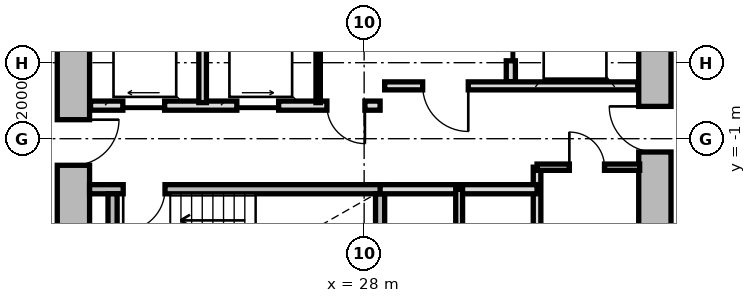
"""IFC4 building model, lengths in metres.
Left out: names, types, materials, properties, quantities, classifications, styles, units other than length and angle.
Written with IfcOpenShell. Run it as: python <this file> out.ifc"""

import sys

from ifc_helpers import new_model, si_unit, direction, frame, frame_2d, origin, place, context, subcontext, project, spatial, rectangle, extrude, source, transform, mapped, element, fill, save


model = new_model("IFC4")
c1 = context("Model", 3, precision=1e-05, world=origin(), true_north=direction((0.0, 1.0)))
c2 = subcontext(c1, "Body", "Model", "MODEL_VIEW")
j1 = project(units=[si_unit("LENGTHUNIT", "METRE"), si_unit("PLANEANGLEUNIT", "RADIAN")], contexts=[c1])
p1 = place(None, origin())
s1 = spatial("IfcSite", under=j1, at=p1, CompositionType="ELEMENT")
p2 = place(p1, origin())
s2 = spatial("IfcBuilding", under=s1, at=p2, CompositionType="ELEMENT")
p3 = place(p2, frame((0.0, 0.0, 39.9)))
s3 = spatial("IfcBuildingStorey", under=s2, at=p3, CompositionType="ELEMENT", Elevation=39.9)
m1 = source(origin(), c2, "Body", "SweptSolid", [
    extrude(rectangle(XDim=11.0, YDim=0.85, at=frame_2d((5.5, 0.0))), origin(), (0.0, 0.0, 1.0), 2.79),
])
p4 = place(p3, frame((20.35, -5.5, 0.0), z_axis=(0.0, 0.0, 1.0), x_axis=(0.0, 1.0, 0.0)))
e1 = element("IfcWall", 1, at=p4, inside=s3, PredefinedType="SHEAR", context=c2, shape_type="MappedRepresentation", body=[
    mapped(m1, transform((0.0, 0.0, 0.0), x_axis=(1.0, 0.0, 0.0), y_axis=(0.0, 1.0, 0.0), z_axis=(0.0, 0.0, 1.0), scale=1.0)),
])
p5 = place(p4, frame((3.8, 0.0, 0.0)))
e2 = element("IfcOpeningElement", 2, at=p5, cuts=e1, PredefinedType="OPENING", context=c2, shape_type="SweptSolid", body=[
    extrude(rectangle(XDim=1.2, YDim=2.15, at=frame_2d((0.6, 1.075))), frame((0.0, 0.435, 0.0), z_axis=(0.0, -1.0, 0.0), x_axis=(1.0, 0.0, 0.0)), (0.0, 0.0, 1.0), 0.87),
])
p6 = place(p3, frame((35.65, 5.5, 0.0), z_axis=(0.0, 0.0, 1.0), x_axis=(0.0, -1.0, 0.0)))
e3 = element("IfcWall", 3, at=p6, inside=s3, PredefinedType="SHEAR", context=c2, shape_type="MappedRepresentation", body=[
    mapped(m1, transform((0.0, 0.0, 0.0), x_axis=(1.0, 0.0, 0.0), y_axis=(0.0, 1.0, 0.0), z_axis=(0.0, 0.0, 1.0), scale=1.0)),
])
p7 = place(p6, frame((5.65, 0.0, 0.0)))
e4 = element("IfcOpeningElement", 4, at=p7, cuts=e3, PredefinedType="OPENING", context=c2, shape_type="SweptSolid", body=[
    extrude(rectangle(XDim=1.2, YDim=2.15, at=frame_2d((0.6, 1.075))), frame((0.0, 0.435, 0.0), z_axis=(0.0, -1.0, 0.0), x_axis=(1.0, 0.0, 0.0)), (0.0, 0.0, 1.0), 0.87),
])
p8 = place(p6, frame((9.3, 0.0, 0.0)))
e5 = element("IfcOpeningElement", 5, at=p8, cuts=e3, PredefinedType="OPENING", context=c2, shape_type="SweptSolid", body=[
    extrude(rectangle(XDim=1.0, YDim=2.1, at=frame_2d((0.5, 1.05))), frame((0.0, 0.435, 0.0), z_axis=(0.0, -1.0, 0.0), x_axis=(1.0, 0.0, 0.0)), (0.0, 0.0, 1.0), 0.87),
])
m2 = source(origin(), c2, "Body", "SweptSolid", [
    extrude(rectangle(XDim=7.765, YDim=0.24, at=frame_2d((3.883, 0.0))), origin(), (0.0, 0.0, 1.0), 2.79),
])
p9 = place(p3, frame((20.775, -2.33, 0.0), z_axis=(0.0, 0.0, 1.0), x_axis=(1.0, 0.0, 0.0)))
e6 = element("IfcWall", 6, at=p9, inside=s3, PredefinedType="PARTITIONING", context=c2, shape_type="MappedRepresentation", body=[
    mapped(m2, transform((0.0, 0.0, 0.0), x_axis=(1.0, 0.0, 0.0), y_axis=(0.0, 1.0, 0.0), z_axis=(0.0, 0.0, 1.0), scale=1.0)),
])
p10 = place(p9, frame((0.885, 0.0, 0.0)))
e7 = element("IfcOpeningElement", 7, at=p10, cuts=e6, PredefinedType="OPENING", context=c2, shape_type="SweptSolid", body=[
    extrude(rectangle(XDim=1.1, YDim=2.15, at=frame_2d((0.55, 1.075))), frame((0.0, 0.13, 0.0), z_axis=(0.0, -1.0, 0.0), x_axis=(1.0, 0.0, 0.0)), (0.0, 0.0, 1.0), 0.26),
])
m3 = source(origin(), c2, "Body", "SweptSolid", [
    extrude(rectangle(XDim=3.075, YDim=0.24, at=frame_2d((1.538, 0.0))), origin(), (0.0, 0.0, 1.0), 2.79),
])
for number, where, z_axis, x_axis in (
    (8, (21.38, -5.525, 0.0), (0.0, 0.0, 1.0), (0.0, 1.0, 0.0)),
    (9, (28.42, -5.525, 0.0), (0.0, 0.0, 1.0), (0.0, 1.0, 0.0)),
):
    element("IfcWall", number, at=place(p3, frame(where, z_axis=z_axis, x_axis=x_axis)), inside=s3, PredefinedType="PARTITIONING", context=c2, shape_type="MappedRepresentation", body=[
        mapped(m3, transform((0.0, 0.0, 0.0), x_axis=(1.0, 0.0, 0.0), y_axis=(0.0, 1.0, 0.0), z_axis=(0.0, 0.0, 1.0), scale=1.0)),
    ])
m4 = source(origin(), c2, "Body", "SweptSolid", [
    extrude(rectangle(XDim=5.0, YDim=0.24, at=frame_2d((2.5, 0.0))), origin(), (0.0, 0.0, 1.0), 2.775),
])
p11 = place(p3, frame((31.86, 0.5, 0.0), z_axis=(0.0, 0.0, 1.0), x_axis=(0.0, 1.0, 0.0)))
e10 = element("IfcWall", 10, at=p11, inside=s3, PredefinedType="PARTITIONING", context=c2, shape_type="MappedRepresentation", body=[
    mapped(m4, transform((0.0, 0.0, 0.0), x_axis=(1.0, 0.0, 0.0), y_axis=(0.0, 1.0, 0.0), z_axis=(0.0, 0.0, 1.0), scale=1.0)),
])
p12 = place(p11, frame((3.05, 0.0, 0.0)))
e11 = element("IfcOpeningElement", 11, at=p12, cuts=e10, PredefinedType="OPENING", context=c2, shape_type="SweptSolid", body=[
    extrude(rectangle(XDim=1.3, YDim=2.2, at=frame_2d((0.65, 1.1))), frame((0.0, 0.13, 0.0), z_axis=(0.0, -1.0, 0.0), x_axis=(1.0, 0.0, 0.0)), (0.0, 0.0, 1.0), 0.26),
])
p13 = place(p11, frame((0.55, 0.0, 0.0)))
e12 = element("IfcOpeningElement", 12, at=p13, cuts=e10, PredefinedType="OPENING", context=c2, shape_type="SweptSolid", body=[
    extrude(rectangle(XDim=1.3, YDim=2.2, at=frame_2d((0.65, 1.1))), frame((0.0, 0.13, 0.0), z_axis=(0.0, -1.0, 0.0), x_axis=(1.0, 0.0, 0.0)), (0.0, 0.0, 1.0), 0.26),
])
m5 = source(origin(), c2, "Body", "SweptSolid", [
    extrude(rectangle(XDim=6.66, YDim=0.21, at=frame_2d((3.33, 0.0))), origin(), (0.0, 0.0, 1.0), 2.775),
])
p14 = place(p3, frame((28.54, 0.39, 0.0), z_axis=(0.0, 0.0, 1.0), x_axis=(1.0, 0.0, 0.0)))
e13 = element("IfcWall", 13, at=p14, inside=s3, PredefinedType="PARTITIONING", context=c2, shape_type="MappedRepresentation", body=[
    mapped(m5, transform((0.0, 0.0, 0.0), x_axis=(1.0, 0.0, 0.0), y_axis=(0.0, 1.0, 0.0), z_axis=(0.0, 0.0, 1.0), scale=1.0)),
])
p15 = place(p14, frame((1.0, 0.0, 0.0)))
e14 = element("IfcOpeningElement", 14, at=p15, cuts=e13, PredefinedType="OPENING", context=c2, shape_type="SweptSolid", body=[
    extrude(rectangle(XDim=1.2, YDim=2.15, at=frame_2d((0.6, 1.075))), frame((0.0, 0.115, 0.0), z_axis=(0.0, -1.0, 0.0), x_axis=(1.0, 0.0, 0.0)), (0.0, 0.0, 1.0), 0.23),
])
m6 = source(origin(), c2, "Body", "SweptSolid", [
    extrude(rectangle(XDim=7.62, YDim=0.24, at=frame_2d((3.81, 0.0))), origin(), (0.0, 0.0, 1.0), 2.775),
])
p16 = place(p3, frame((20.8, -0.13, 0.0), z_axis=(0.0, 0.0, 1.0), x_axis=(1.0, 0.0, 0.0)))
e15 = element("IfcWall", 15, at=p16, inside=s3, PredefinedType="PARTITIONING", context=c2, shape_type="MappedRepresentation", body=[
    mapped(m6, transform((0.0, 0.0, 0.0), x_axis=(1.0, 0.0, 0.0), y_axis=(0.0, 1.0, 0.0), z_axis=(0.0, 0.0, 1.0), scale=1.0)),
])
p17 = place(p16, frame((6.22, 0.0, 0.0)))
e16 = element("IfcOpeningElement", 16, at=p17, cuts=e15, PredefinedType="OPENING", context=c2, shape_type="SweptSolid", body=[
    extrude(rectangle(XDim=1.0, YDim=2.1, at=frame_2d((0.5, 1.05))), frame((0.0, 0.13, 0.0), z_axis=(0.0, -1.0, 0.0), x_axis=(1.0, 0.0, 0.0)), (0.0, 0.0, 1.0), 0.26),
])
p18 = place(p16, frame((0.85, 0.0, 0.0)))
e17 = element("IfcOpeningElement", 17, at=p18, cuts=e15, PredefinedType="OPENING", context=c2, shape_type="SweptSolid", body=[
    extrude(rectangle(XDim=1.1, YDim=2.2, at=frame_2d((0.55, 1.1))), frame((0.0, 0.13, 0.0), z_axis=(0.0, -1.0, 0.0), x_axis=(1.0, 0.0, 0.0)), (0.0, 0.0, 1.0), 0.26),
])
p19 = place(p16, frame((3.85, 0.0, 0.0)))
e18 = element("IfcOpeningElement", 18, at=p19, cuts=e15, PredefinedType="OPENING", context=c2, shape_type="SweptSolid", body=[
    extrude(rectangle(XDim=1.1, YDim=2.2, at=frame_2d((0.55, 1.1))), frame((0.0, 0.13, 0.0), z_axis=(0.0, -1.0, 0.0), x_axis=(1.0, 0.0, 0.0)), (0.0, 0.0, 1.0), 0.26),
])
m7 = source(origin(), c2, "Body", "SweptSolid", [
    extrude(rectangle(XDim=2.33, YDim=0.115, at=frame_2d((1.165, 0.0))), origin(), (0.0, 0.0, 1.0), 2.775),
])
p20 = place(p3, frame((26.79, -0.05, 0.0), z_axis=(0.0, 0.0, 1.0), x_axis=(0.0, 1.0, 0.0)))
e19 = element("IfcWall", 19, at=p20, inside=s3, PredefinedType="PARTITIONING", context=c2, shape_type="MappedRepresentation", body=[
    mapped(m7, transform((0.0, 0.0, 0.0), x_axis=(1.0, 0.0, 0.0), y_axis=(0.0, 1.0, 0.0), z_axis=(0.0, 0.0, 1.0), scale=1.0)),
])
m8 = source(origin(), c2, "Body", "SweptSolid", [
    extrude(rectangle(XDim=2.33, YDim=0.2, at=frame_2d((1.165, 0.0))), origin(), (0.0, 0.0, 1.0), 2.775),
])
p21 = place(p3, frame((23.75, -0.05, 0.0), z_axis=(0.0, 0.0, 1.0), x_axis=(0.0, 1.0, 0.0)))
e20 = element("IfcWall", 20, at=p21, inside=s3, PredefinedType="PARTITIONING", context=c2, shape_type="MappedRepresentation", body=[
    mapped(m8, transform((0.0, 0.0, 0.0), x_axis=(1.0, 0.0, 0.0), y_axis=(0.0, 1.0, 0.0), z_axis=(0.0, 0.0, 1.0), scale=1.0)),
])
m9 = source(origin(), c2, "Body", "SweptSolid", [
    extrude(rectangle(XDim=3.8, YDim=0.2, at=frame_2d((1.9, 0.0))), origin(), (0.0, 0.0, 1.0), 2.775),
])
p22 = place(p3, frame((32.55, -5.55, 0.0), z_axis=(0.0, 0.0, 1.0), x_axis=(0.0, 1.0, 0.0)))
e21 = element("IfcWall", 21, at=p22, inside=s3, PredefinedType="PARTITIONING", context=c2, shape_type="MappedRepresentation", body=[
    mapped(m9, transform((0.0, 0.0, 0.0), x_axis=(1.0, 0.0, 0.0), y_axis=(0.0, 1.0, 0.0), z_axis=(0.0, 0.0, 1.0), scale=1.0)),
])
m10 = source(origin(), c2, "Body", "SweptSolid", [
    extrude(rectangle(XDim=4.13, YDim=0.24, at=frame_2d((2.065, 0.0))), origin(), (0.0, 0.0, 1.0), 2.775),
])
p23 = place(p3, frame((28.42, -2.33, 0.0), z_axis=(0.0, 0.0, 1.0), x_axis=(1.0, 0.0, 0.0)))
e22 = element("IfcWall", 22, at=p23, inside=s3, PredefinedType="PARTITIONING", context=c2, shape_type="MappedRepresentation", body=[
    mapped(m10, transform((0.0, 0.0, 0.0), x_axis=(1.0, 0.0, 0.0), y_axis=(0.0, 1.0, 0.0), z_axis=(0.0, 0.0, 1.0), scale=1.0)),
])
m11 = source(origin(), c2, "Body", "SweptSolid", [
    extrude(rectangle(XDim=3.22, YDim=0.18, at=frame_2d((1.61, 0.0))), origin(), (0.0, 0.0, 1.0), 2.775),
])
p24 = place(p3, frame((30.5, -5.55, 0.0), z_axis=(0.0, 0.0, 1.0), x_axis=(0.0, 1.0, 0.0)))
e23 = element("IfcWall", 23, at=p24, inside=s3, PredefinedType="PARTITIONING", context=c2, shape_type="MappedRepresentation", body=[
    mapped(m11, transform((0.0, 0.0, 0.0), x_axis=(1.0, 0.0, 0.0), y_axis=(0.0, 1.0, 0.0), z_axis=(0.0, 0.0, 1.0), scale=1.0)),
])
m12 = source(origin(), c2, "Body", "SweptSolid", [
    extrude(rectangle(XDim=2.7, YDim=0.165, at=frame_2d((1.35, 0.0))), origin(), (0.0, 0.0, 1.0), 2.775),
])
p25 = place(p3, frame((32.55, -1.75, 0.0), z_axis=(0.0, 0.0, 1.0), x_axis=(1.0, 0.0, 0.0)))
e24 = element("IfcWall", 24, at=p25, inside=s3, PredefinedType="PARTITIONING", context=c2, shape_type="MappedRepresentation", body=[
    mapped(m12, transform((0.0, 0.0, 0.0), x_axis=(1.0, 0.0, 0.0), y_axis=(0.0, 1.0, 0.0), z_axis=(0.0, 0.0, 1.0), scale=1.0)),
])
p26 = place(p25, frame((0.85, 0.0, 0.0)))
e25 = element("IfcOpeningElement", 25, at=p26, cuts=e24, PredefinedType="OPENING", context=c2, shape_type="SweptSolid", body=[
    extrude(rectangle(XDim=0.925, YDim=2.1, at=frame_2d((0.462, 1.05))), frame((0.0, 0.093, 0.0), z_axis=(0.0, -1.0, 0.0), x_axis=(1.0, 0.0, 0.0)), (0.0, 0.0, 1.0), 0.185),
])
m13 = source(origin(), c2, "Body", "SweptSolid", [
    extrude(rectangle(XDim=1.1, YDim=2.15, at=frame_2d((0.55, 1.075))), frame((0.0, 0.025, 0.0), z_axis=(0.0, -1.0, 0.0), x_axis=(1.0, 0.0, 0.0)), (0.0, 0.0, 1.0), 0.05),
])
p27 = place(p10, frame((1.1, 0.0, 0.0), z_axis=(0.0, 0.0, 1.0), x_axis=(-1.0, 0.0, 0.0)))
e26 = element("IfcDoor", 26, at=p27, inside=s3, OperationType="SINGLE_SWING_RIGHT", PredefinedType="DOOR", context=c2, shape_type="MappedRepresentation", body=[
    mapped(m13, transform((0.0, 0.0, 0.0), x_axis=(1.0, 0.0, 0.0), y_axis=(0.0, 1.0, 0.0), z_axis=(0.0, 0.0, 1.0), scale=1.0)),
])
fill(e7, e26)
m14 = source(origin(), c2, "Body", "SweptSolid", [
    extrude(rectangle(XDim=1.3, YDim=2.2, at=frame_2d((0.65, 1.1))), frame((0.0, 0.025, 0.0), z_axis=(0.0, -1.0, 0.0), x_axis=(1.0, 0.0, 0.0)), (0.0, 0.0, 1.0), 0.05),
])
p28 = place(p13, origin())
e27 = element("IfcDoor", 27, at=p28, inside=s3, OperationType="SLIDING_TO_RIGHT", PredefinedType="DOOR", context=c2, shape_type="MappedRepresentation", body=[
    mapped(m14, transform((0.0, 0.0, 0.0), x_axis=(1.0, 0.0, 0.0), y_axis=(0.0, 1.0, 0.0), z_axis=(0.0, 0.0, 1.0), scale=1.0)),
])
fill(e12, e27)
m15 = source(origin(), c2, "Body", "SweptSolid", [
    extrude(rectangle(XDim=1.2, YDim=2.15, at=frame_2d((0.6, 1.075))), frame((0.0, 0.025, 0.0), z_axis=(0.0, -1.0, 0.0), x_axis=(1.0, 0.0, 0.0)), (0.0, 0.0, 1.0), 0.05),
])
p29 = place(p15, frame((1.2, 0.0, 0.0), z_axis=(0.0, 0.0, 1.0), x_axis=(-1.0, 0.0, 0.0)))
e28 = element("IfcDoor", 28, at=p29, inside=s3, OperationType="SINGLE_SWING_LEFT", PredefinedType="DOOR", context=c2, shape_type="MappedRepresentation", body=[
    mapped(m15, transform((0.0, 0.0, 0.0), x_axis=(1.0, 0.0, 0.0), y_axis=(0.0, 1.0, 0.0), z_axis=(0.0, 0.0, 1.0), scale=1.0)),
])
fill(e14, e28)
p30 = place(p5, frame((1.2, 0.0, 0.0), z_axis=(0.0, 0.0, 1.0), x_axis=(-1.0, 0.0, 0.0)))
e29 = element("IfcDoor", 29, at=p30, inside=s3, OperationType="SINGLE_SWING_LEFT", PredefinedType="DOOR", context=c2, shape_type="MappedRepresentation", body=[
    mapped(m15, transform((0.0, 0.0, 0.0), x_axis=(1.0, 0.0, 0.0), y_axis=(0.0, 1.0, 0.0), z_axis=(0.0, 0.0, 1.0), scale=1.0)),
])
fill(e2, e29)
p31 = place(p7, frame((1.2, 0.0, 0.0), z_axis=(0.0, 0.0, 1.0), x_axis=(-1.0, 0.0, 0.0)))
e30 = element("IfcDoor", 30, at=p31, inside=s3, OperationType="SINGLE_SWING_RIGHT", PredefinedType="DOOR", context=c2, shape_type="MappedRepresentation", body=[
    mapped(m15, transform((0.0, 0.0, 0.0), x_axis=(1.0, 0.0, 0.0), y_axis=(0.0, 1.0, 0.0), z_axis=(0.0, 0.0, 1.0), scale=1.0)),
])
fill(e4, e30)
m16 = source(origin(), c2, "Body", "SweptSolid", [
    extrude(rectangle(XDim=1.0, YDim=2.1, at=frame_2d((0.5, 1.05))), frame((0.0, 0.025, 0.0), z_axis=(0.0, -1.0, 0.0), x_axis=(1.0, 0.0, 0.0)), (0.0, 0.0, 1.0), 0.05),
])
p32 = place(p17, frame((1.0, 0.0, 0.0), z_axis=(0.0, 0.0, 1.0), x_axis=(-1.0, 0.0, 0.0)))
e31 = element("IfcDoor", 31, at=p32, inside=s3, OperationType="SINGLE_SWING_LEFT", PredefinedType="DOOR", context=c2, shape_type="MappedRepresentation", body=[
    mapped(m16, transform((0.0, 0.0, 0.0), x_axis=(1.0, 0.0, 0.0), y_axis=(0.0, 1.0, 0.0), z_axis=(0.0, 0.0, 1.0), scale=1.0)),
])
fill(e16, e31)
m17 = source(origin(), c2, "Body", "SweptSolid", [
    extrude(rectangle(XDim=1.1, YDim=2.2, at=frame_2d((0.55, 1.1))), frame((0.0, 0.025, 0.0), z_axis=(0.0, -1.0, 0.0), x_axis=(1.0, 0.0, 0.0)), (0.0, 0.0, 1.0), 0.05),
])
p33 = place(p18, origin())
e32 = element("IfcDoor", 32, at=p33, inside=s3, OperationType="SLIDING_TO_LEFT", PredefinedType="DOOR", context=c2, shape_type="MappedRepresentation", body=[
    mapped(m17, transform((0.0, 0.0, 0.0), x_axis=(1.0, 0.0, 0.0), y_axis=(0.0, 1.0, 0.0), z_axis=(0.0, 0.0, 1.0), scale=1.0)),
])
fill(e17, e32)
p34 = place(p19, origin())
e33 = element("IfcDoor", 33, at=p34, inside=s3, OperationType="SLIDING_TO_RIGHT", PredefinedType="DOOR", context=c2, shape_type="MappedRepresentation", body=[
    mapped(m17, transform((0.0, 0.0, 0.0), x_axis=(1.0, 0.0, 0.0), y_axis=(0.0, 1.0, 0.0), z_axis=(0.0, 0.0, 1.0), scale=1.0)),
])
fill(e18, e33)
m18 = source(origin(), c2, "Body", "SweptSolid", [
    extrude(rectangle(XDim=0.925, YDim=2.1, at=frame_2d((0.462, 1.05))), frame((0.0, 0.025, 0.0), z_axis=(0.0, -1.0, 0.0), x_axis=(1.0, 0.0, 0.0)), (0.0, 0.0, 1.0), 0.05),
])
p35 = place(p26, origin())
e34 = element("IfcDoor", 34, at=p35, inside=s3, OperationType="SINGLE_SWING_LEFT", PredefinedType="DOOR", context=c2, shape_type="MappedRepresentation", body=[
    mapped(m18, transform((0.0, 0.0, 0.0), x_axis=(1.0, 0.0, 0.0), y_axis=(0.0, 1.0, 0.0), z_axis=(0.0, 0.0, 1.0), scale=1.0)),
])
fill(e25, e34)
save(model, sys.argv[1])
